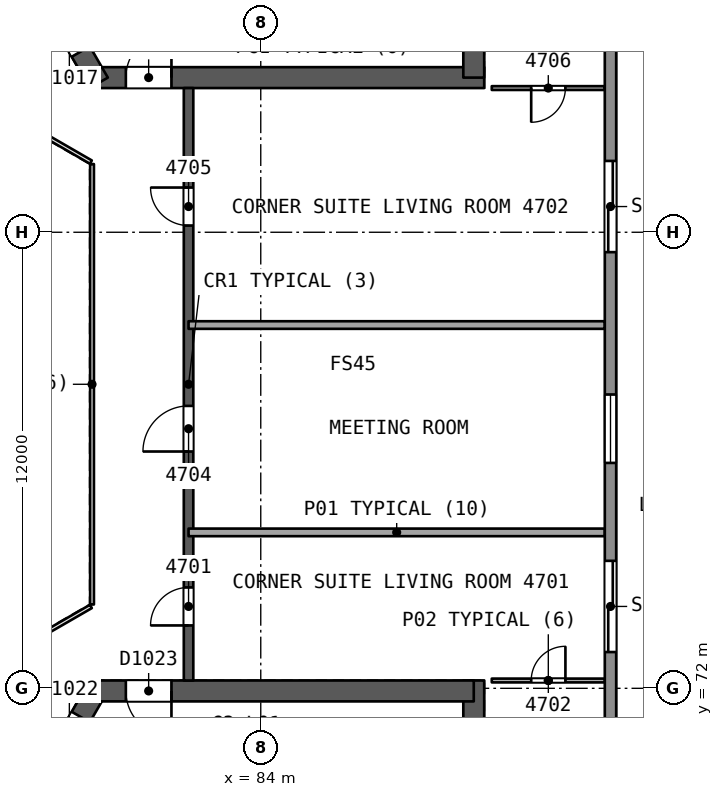
"""IFC4 building model, lengths in metres.
Left out: names, types, materials, properties, quantities, classifications, styles, units other than length and angle.
Written with IfcOpenShell. Run it as: python <this file> out.ifc"""

import sys

from ifc_helpers import new_model, si_unit, direction, frame, frame_2d, origin, place, context, subcontext, project, spatial, rectangle, extrude, element, fill, save


model = new_model("IFC4")
c1 = context("Model", 3, precision=1e-05, world=origin(), true_north=direction((0.0, 1.0)))
c2 = subcontext(c1, "Body", "Model", "MODEL_VIEW")
j1 = project(units=[si_unit("LENGTHUNIT", "METRE"), si_unit("PLANEANGLEUNIT", "RADIAN")], contexts=[c1])
p1 = place(None, origin())
s1 = spatial("IfcSite", under=j1, at=p1, CompositionType="ELEMENT")
p2 = place(p1, origin())
s2 = spatial("IfcBuilding", under=s1, at=p2, CompositionType="ELEMENT")
p3 = place(p2, frame((0.0, 0.0, 193.3)))
s3 = spatial("IfcBuildingStorey", under=s2, at=p3, CompositionType="ELEMENT", Elevation=193.3)
p4 = place(p3, frame((79.659, 88.069, 0.0), z_axis=(0.0, 0.0, 1.0), x_axis=(1.0, 0.0, 0.0)))
e1 = element("IfcWall", 1, at=p4, inside=s3, PredefinedType="SHEAR", context=c2, shape_type="SweptSolid", body=[
    extrude(rectangle(XDim=10.221, YDim=0.55, at=frame_2d((5.111, 0.0))), origin(), (0.0, 0.0, 1.0), 3.7),
])
p5 = place(p4, frame((0.791, 0.0, 0.0)))
e2 = element("IfcOpeningElement", 2, at=p5, cuts=e1, PredefinedType="OPENING", context=c2, shape_type="SweptSolid", body=[
    extrude(rectangle(XDim=1.2, YDim=2.1, at=frame_2d((0.6, 1.05))), frame((0.0, 0.286, 0.0), z_axis=(0.0, -1.0, 0.0), x_axis=(1.0, 0.0, 0.0)), (0.0, 0.0, 1.0), 0.571),
])
p6 = place(p3, frame((89.605, 88.069, 0.0), z_axis=(0.0, 0.0, 1.0), x_axis=(0.0, 1.0, 0.0)))
e3 = element("IfcWall", 3, at=p6, inside=s3, PredefinedType="SHEAR", context=c2, shape_type="SweptSolid", body=[
    extrude(rectangle(XDim=14.058, YDim=0.55, at=frame_2d((7.029, 0.0))), origin(), (0.0, 0.0, 1.0), 3.7),
])
p7 = place(p3, frame((74.686, 96.683, 0.0), z_axis=(0.0, 0.0, 1.0), x_axis=(0.499997818338, -0.866026663364, 0.0)))
e4 = element("IfcWall", 4, at=p7, inside=s3, PredefinedType="SHEAR", context=c2, shape_type="SweptSolid", body=[
    extrude(rectangle(XDim=10.105, YDim=0.55, at=frame_2d((5.052, 0.0))), origin(), (0.0, 0.0, 1.0), 3.7),
])
p8 = place(p7, frame((7.955, 0.0, 0.0)))
e5 = element("IfcOpeningElement", 5, at=p8, cuts=e4, PredefinedType="OPENING", context=c2, shape_type="SweptSolid", body=[
    extrude(rectangle(XDim=1.2, YDim=2.1, at=frame_2d((0.6, 1.05))), frame((0.0, 0.286, 0.0), z_axis=(0.0, -1.0, 0.0), x_axis=(1.0, 0.0, 0.0)), (0.0, 0.0, 1.0), 0.571),
])
p9 = place(p3, frame((79.659, 71.931, 0.0), z_axis=(0.0, 0.0, 1.0), x_axis=(-0.500000202252, -0.866025287014, 0.0)))
e6 = element("IfcWall", 6, at=p9, inside=s3, PredefinedType="SHEAR", context=c2, shape_type="SweptSolid", body=[
    extrude(rectangle(XDim=10.221, YDim=0.55, at=frame_2d((5.111, 0.0))), origin(), (0.0, 0.0, 1.0), 3.7),
])
p10 = place(p9, frame((0.791, 0.0, 0.0)))
e7 = element("IfcOpeningElement", 7, at=p10, cuts=e6, PredefinedType="OPENING", context=c2, shape_type="SweptSolid", body=[
    extrude(rectangle(XDim=1.2, YDim=2.1, at=frame_2d((0.6, 1.05))), frame((0.0, 0.286, 0.0), z_axis=(0.0, -1.0, 0.0), x_axis=(1.0, 0.0, 0.0)), (0.0, 0.0, 1.0), 0.571),
])
p11 = place(p3, frame((89.605, 58.031, 0.0), z_axis=(0.0, 0.0, 1.0), x_axis=(0.0, 1.0, 0.0)))
e8 = element("IfcWall", 8, at=p11, inside=s3, PredefinedType="SHEAR", context=c2, shape_type="SweptSolid", body=[
    extrude(rectangle(XDim=14.175, YDim=0.55, at=frame_2d((7.087, 0.0))), origin(), (0.0, 0.0, 1.0), 3.7),
])
p12 = place(p3, frame((89.605, 71.931, 0.0), z_axis=(0.0, 0.0, 1.0), x_axis=(-1.0, 0.0, 0.0)))
e9 = element("IfcWall", 9, at=p12, inside=s3, PredefinedType="SHEAR", context=c2, shape_type="SweptSolid", body=[
    extrude(rectangle(XDim=10.105, YDim=0.55, at=frame_2d((5.052, 0.0))), origin(), (0.0, 0.0, 1.0), 3.7),
])
p13 = place(p12, frame((7.955, 0.0, 0.0)))
e10 = element("IfcOpeningElement", 10, at=p13, cuts=e9, PredefinedType="OPENING", context=c2, shape_type="SweptSolid", body=[
    extrude(rectangle(XDim=1.2, YDim=2.1, at=frame_2d((0.6, 1.05))), frame((0.0, 0.286, 0.0), z_axis=(0.0, -1.0, 0.0), x_axis=(1.0, 0.0, 0.0)), (0.0, 0.0, 1.0), 0.571),
])
p14 = place(p3, frame((82.1, 72.206, 0.0), z_axis=(0.0, 0.0, 1.0), x_axis=(0.0, 1.0, 0.0)))
e11 = element("IfcWall", 11, at=p14, inside=s3, PredefinedType="SHEAR", context=c2, shape_type="SweptSolid", body=[
    extrude(rectangle(XDim=15.588, YDim=0.25, at=frame_2d((7.794, 0.0))), origin(), (0.0, 0.0, 1.0), 3.3),
])
p15 = place(p14, frame((1.448, 0.0, 0.0)))
e12 = element("IfcOpeningElement", 12, at=p15, cuts=e11, PredefinedType="OPENING", context=c2, shape_type="SweptSolid", body=[
    extrude(rectangle(XDim=1.0, YDim=2.1, at=frame_2d((0.5, 1.05))), frame((0.0, 0.135, 0.0), z_axis=(0.0, -1.0, 0.0), x_axis=(1.0, 0.0, 0.0)), (0.0, 0.0, 1.0), 0.271),
])
p16 = place(p14, frame((6.025, 0.0, 0.0)))
e13 = element("IfcOpeningElement", 13, at=p16, cuts=e11, PredefinedType="OPENING", context=c2, shape_type="SweptSolid", body=[
    extrude(rectangle(XDim=1.2, YDim=2.4, at=frame_2d((0.6, 1.2))), frame((0.0, 0.135, 0.0), z_axis=(0.0, -1.0, 0.0), x_axis=(1.0, 0.0, 0.0)), (0.0, 0.0, 1.0), 0.271),
])
p17 = place(p14, frame((11.971, 0.0, 0.0)))
e14 = element("IfcOpeningElement", 14, at=p17, cuts=e11, PredefinedType="OPENING", context=c2, shape_type="SweptSolid", body=[
    extrude(rectangle(XDim=1.0, YDim=2.1, at=frame_2d((0.5, 1.05))), frame((0.0, 0.135, 0.0), z_axis=(0.0, -1.0, 0.0), x_axis=(1.0, 0.0, 0.0)), (0.0, 0.0, 1.0), 0.271),
])
p18 = place(p3, frame((90.079, 72.206, 0.0), z_axis=(0.0, 0.0, 1.0), x_axis=(1.0, 0.0, 0.0)))
e15 = element("IfcWall", 15, at=p18, inside=s3, PredefinedType="PARTITIONING", context=c2, shape_type="SweptSolid", body=[
    extrude(rectangle(XDim=2.975, YDim=0.1, at=frame_2d((1.488, 0.0))), origin(), (0.0, 0.0, 1.0), 3.3),
])
p19 = place(p18, frame((1.038, 0.0, 0.0)))
e16 = element("IfcOpeningElement", 16, at=p19, cuts=e15, PredefinedType="OPENING", context=c2, shape_type="SweptSolid", body=[
    extrude(rectangle(XDim=0.9, YDim=2.1, at=frame_2d((0.45, 1.05))), frame((0.0, 0.061, 0.0), z_axis=(0.0, -1.0, 0.0), x_axis=(1.0, 0.0, 0.0)), (0.0, 0.0, 1.0), 0.121),
])
for number, where, z_axis, x_axis in (
    (17, (93.054, 76.103, 0.0), (0.0, 0.0, 1.0), (-1.0, 0.0, 0.0)),
    (18, (93.054, 81.559, 0.0), (0.0, 0.0, 1.0), (-1.0, 0.0, 0.0)),
):
    element("IfcWall", number, at=place(p3, frame(where, z_axis=z_axis, x_axis=x_axis)), inside=s3, PredefinedType="PARTITIONING", context=c2, shape_type="SweptSolid", body=[
        extrude(rectangle(XDim=10.954, YDim=0.2, at=frame_2d((5.477, 0.0))), origin(), (0.0, 0.0, 1.0), 3.3),
    ])
p20 = place(p3, frame((93.054, 87.794, 0.0), z_axis=(0.0, 0.0, 1.0), x_axis=(-1.0, 0.0, 0.0)))
e19 = element("IfcWall", 19, at=p20, inside=s3, PredefinedType="PARTITIONING", context=c2, shape_type="SweptSolid", body=[
    extrude(rectangle(XDim=2.975, YDim=0.1, at=frame_2d((1.488, 0.0))), origin(), (0.0, 0.0, 1.0), 3.3),
])
p21 = place(p20, frame((1.038, 0.0, 0.0)))
e20 = element("IfcOpeningElement", 20, at=p21, cuts=e19, PredefinedType="OPENING", context=c2, shape_type="SweptSolid", body=[
    extrude(rectangle(XDim=0.9, YDim=2.1, at=frame_2d((0.45, 1.05))), frame((0.0, 0.061, 0.0), z_axis=(0.0, -1.0, 0.0), x_axis=(1.0, 0.0, 0.0)), (0.0, 0.0, 1.0), 0.121),
])
p22 = place(p3, frame((93.203, 106.173, 0.0), z_axis=(0.0, 0.0, 1.0), x_axis=(0.0, -1.0, 0.0)))
e21 = element("IfcWall", 21, at=p22, inside=s3, PredefinedType="SOLIDWALL", context=c2, shape_type="SweptSolid", body=[
    extrude(rectangle(XDim=52.347, YDim=0.3, at=frame_2d((26.173, 0.0))), origin(), (0.0, 0.0, 1.0), 3.3),
])
p23 = place(p22, frame((30.819, 0.0, 0.0)))
e22 = element("IfcOpeningElement", 22, at=p23, cuts=e21, PredefinedType="OPENING", context=c2, shape_type="SweptSolid", body=[
    extrude(rectangle(XDim=2.4, YDim=2.4, at=frame_2d((1.2, 1.2))), frame((0.0, 0.161, 0.0), z_axis=(0.0, -1.0, 0.0), x_axis=(1.0, 0.0, 0.0)), (0.0, 0.0, 1.0), 0.321),
])
p24 = place(p22, frame((40.7, 0.0, 0.0)))
e23 = element("IfcOpeningElement", 23, at=p24, cuts=e21, PredefinedType="OPENING", context=c2, shape_type="SweptSolid", body=[
    extrude(rectangle(XDim=2.4, YDim=2.4, at=frame_2d((1.2, 1.2))), frame((0.0, 0.161, 0.0), z_axis=(0.0, -1.0, 0.0), x_axis=(1.0, 0.0, 0.0)), (0.0, 0.0, 1.0), 0.321),
])
p25 = place(p22, frame((20.297, 0.0, 0.0)))
e24 = element("IfcOpeningElement", 24, at=p25, cuts=e21, PredefinedType="OPENING", context=c2, shape_type="SweptSolid", body=[
    extrude(rectangle(XDim=2.4, YDim=2.4, at=frame_2d((1.2, 1.2))), frame((0.0, 0.161, 0.0), z_axis=(0.0, -1.0, 0.0), x_axis=(1.0, 0.0, 0.0)), (0.0, 0.0, 1.0), 0.321),
])
p26 = place(p22, frame((9.27, 0.0, 0.0)))
e25 = element("IfcOpeningElement", 25, at=p26, cuts=e21, PredefinedType="OPENING", context=c2, shape_type="SweptSolid", body=[
    extrude(rectangle(XDim=2.4, YDim=2.4, at=frame_2d((1.2, 1.2))), frame((0.0, 0.161, 0.0), z_axis=(0.0, -1.0, 0.0), x_axis=(1.0, 0.0, 0.0)), (0.0, 0.0, 1.0), 0.321),
])
p27 = place(p22, frame((26.442, 0.0, 0.9)))
e26 = element("IfcOpeningElement", 26, at=p27, cuts=e21, PredefinedType="OPENING", context=c2, shape_type="SweptSolid", body=[
    extrude(rectangle(XDim=1.8, YDim=1.5, at=frame_2d((0.9, 0.75))), frame((0.0, 0.161, 0.0), z_axis=(0.0, -1.0, 0.0), x_axis=(1.0, 0.0, 0.0)), (0.0, 0.0, 1.0), 0.321),
])
p28 = place(p3, frame((43.232, 82.678, 0.0), z_axis=(0.0, 0.0, 1.0), x_axis=(0.866025125259, 0.500000482419, 0.0)))
e27 = element("IfcWall", 27, at=p28, inside=s3, PredefinedType="SOLIDWALL", context=c2, shape_type="SweptSolid", body=[
    extrude(rectangle(XDim=52.347, YDim=0.3, at=frame_2d((26.173, 0.0))), origin(), (0.0, 0.0, 1.0), 3.3),
])
p29 = place(p28, frame((31.209, 0.0, 0.0)))
e28 = element("IfcOpeningElement", 28, at=p29, cuts=e27, PredefinedType="OPENING", context=c2, shape_type="SweptSolid", body=[
    extrude(rectangle(XDim=2.4, YDim=2.4, at=frame_2d((1.2, 1.2))), frame((0.0, 0.161, 0.0), z_axis=(0.0, -1.0, 0.0), x_axis=(1.0, 0.0, 0.0)), (0.0, 0.0, 1.0), 0.321),
])
p30 = place(p28, frame((40.7, 0.0, 0.0)))
e29 = element("IfcOpeningElement", 29, at=p30, cuts=e27, PredefinedType="OPENING", context=c2, shape_type="SweptSolid", body=[
    extrude(rectangle(XDim=2.4, YDim=2.4, at=frame_2d((1.2, 1.2))), frame((0.0, 0.161, 0.0), z_axis=(0.0, -1.0, 0.0), x_axis=(1.0, 0.0, 0.0)), (0.0, 0.0, 1.0), 0.321),
])
p31 = place(p28, frame((19.517, 0.0, 0.0)))
e30 = element("IfcOpeningElement", 30, at=p31, cuts=e27, PredefinedType="OPENING", context=c2, shape_type="SweptSolid", body=[
    extrude(rectangle(XDim=2.4, YDim=2.4, at=frame_2d((1.2, 1.2))), frame((0.0, 0.161, 0.0), z_axis=(0.0, -1.0, 0.0), x_axis=(1.0, 0.0, 0.0)), (0.0, 0.0, 1.0), 0.321),
])
p32 = place(p28, frame((9.27, 0.0, 0.0)))
e31 = element("IfcOpeningElement", 31, at=p32, cuts=e27, PredefinedType="OPENING", context=c2, shape_type="SweptSolid", body=[
    extrude(rectangle(XDim=2.4, YDim=2.4, at=frame_2d((1.2, 1.2))), frame((0.0, 0.161, 0.0), z_axis=(0.0, -1.0, 0.0), x_axis=(1.0, 0.0, 0.0)), (0.0, 0.0, 1.0), 0.321),
])
p33 = place(p28, frame((28.001, 0.0, 0.9)))
e32 = element("IfcOpeningElement", 32, at=p33, cuts=e27, PredefinedType="OPENING", context=c2, shape_type="SweptSolid", body=[
    extrude(rectangle(XDim=1.8, YDim=1.5, at=frame_2d((0.9, 0.75))), frame((0.0, 0.161, 0.0), z_axis=(0.0, -1.0, 0.0), x_axis=(1.0, 0.0, 0.0)), (0.0, 0.0, 1.0), 0.321),
])
p34 = place(p28, frame((24.104, 0.0, 0.9)))
e33 = element("IfcOpeningElement", 33, at=p34, cuts=e27, PredefinedType="OPENING", context=c2, shape_type="SweptSolid", body=[
    extrude(rectangle(XDim=1.8, YDim=1.5, at=frame_2d((0.9, 0.75))), frame((0.0, 0.161, 0.0), z_axis=(0.0, -1.0, 0.0), x_axis=(1.0, 0.0, 0.0)), (0.0, 0.0, 1.0), 0.321),
])
p35 = place(p3, frame((88.565, 51.149, 0.0), z_axis=(0.0, 0.0, 1.0), x_axis=(-0.866025125259, 0.500000482419, 0.0)))
e34 = element("IfcWall", 34, at=p35, inside=s3, PredefinedType="SOLIDWALL", context=c2, shape_type="SweptSolid", body=[
    extrude(rectangle(XDim=52.347, YDim=0.3, at=frame_2d((26.173, 0.0))), origin(), (0.0, 0.0, 1.0), 3.3),
])
p36 = place(p35, frame((29.26, 0.0, 0.0)))
e35 = element("IfcOpeningElement", 35, at=p36, cuts=e34, PredefinedType="OPENING", context=c2, shape_type="SweptSolid", body=[
    extrude(rectangle(XDim=2.4, YDim=2.4, at=frame_2d((1.2, 1.2))), frame((0.0, 0.161, 0.0), z_axis=(0.0, -1.0, 0.0), x_axis=(1.0, 0.0, 0.0)), (0.0, 0.0, 1.0), 0.321),
])
p37 = place(p35, frame((40.7, 0.0, 0.0)))
e36 = element("IfcOpeningElement", 36, at=p37, cuts=e34, PredefinedType="OPENING", context=c2, shape_type="SweptSolid", body=[
    extrude(rectangle(XDim=2.4, YDim=2.4, at=frame_2d((1.2, 1.2))), frame((0.0, 0.161, 0.0), z_axis=(0.0, -1.0, 0.0), x_axis=(1.0, 0.0, 0.0)), (0.0, 0.0, 1.0), 0.321),
])
p38 = place(p35, frame((19.517, 0.0, 0.0)))
e37 = element("IfcOpeningElement", 37, at=p38, cuts=e34, PredefinedType="OPENING", context=c2, shape_type="SweptSolid", body=[
    extrude(rectangle(XDim=2.4, YDim=2.4, at=frame_2d((1.2, 1.2))), frame((0.0, 0.161, 0.0), z_axis=(0.0, -1.0, 0.0), x_axis=(1.0, 0.0, 0.0)), (0.0, 0.0, 1.0), 0.321),
])
p39 = place(p35, frame((9.27, 0.0, 0.0)))
e38 = element("IfcOpeningElement", 38, at=p39, cuts=e34, PredefinedType="OPENING", context=c2, shape_type="SweptSolid", body=[
    extrude(rectangle(XDim=2.4, YDim=2.4, at=frame_2d((1.2, 1.2))), frame((0.0, 0.161, 0.0), z_axis=(0.0, -1.0, 0.0), x_axis=(1.0, 0.0, 0.0)), (0.0, 0.0, 1.0), 0.321),
])
p40 = place(p35, frame((24.104, 0.0, 0.9)))
e39 = element("IfcOpeningElement", 39, at=p40, cuts=e34, PredefinedType="OPENING", context=c2, shape_type="SweptSolid", body=[
    extrude(rectangle(XDim=1.8, YDim=1.5, at=frame_2d((0.9, 0.75))), frame((0.0, 0.161, 0.0), z_axis=(0.0, -1.0, 0.0), x_axis=(1.0, 0.0, 0.0)), (0.0, 0.0, 1.0), 0.321),
])
p41 = place(p3, frame((79.56, 74.206, 0.0), z_axis=(0.0, 0.0, 1.0), x_axis=(0.0, 1.0, 0.0)))
e40 = element("IfcWall", 40, at=p41, inside=s3, PredefinedType="PARTITIONING", context=c2, shape_type="SweptSolid", body=[
    extrude(rectangle(XDim=11.588, YDim=0.1, at=frame_2d((5.794, 0.0))), origin(), (0.0, 0.0, 1.0), 3.3),
])
for number, where, z_axis, x_axis in (
    (41, (79.53, 85.846, 0.0), (0.0, 0.0, 1.0), (-0.866, 0.5, 0.0)),
    (42, (77.798, 73.154, 0.0), (0.0, 0.0, 1.0), (0.866, 0.5, 0.0)),
):
    element("IfcWall", number, at=place(p3, frame(where, z_axis=z_axis, x_axis=x_axis)), inside=s3, PredefinedType="PARTITIONING", context=c2, shape_type="SweptSolid", body=[
        extrude(rectangle(XDim=2.0, YDim=0.1, at=frame_2d((1.0, 0.0))), origin(), (0.0, 0.0, 1.0), 3.3),
    ])
p42 = place(p15, origin())
e43 = element("IfcDoor", 43, at=p42, inside=s3, OperationType="SINGLE_SWING_LEFT", PredefinedType="NOTDEFINED", context=c2, shape_type="SweptSolid", body=[
    extrude(rectangle(XDim=1.0, YDim=2.1, at=frame_2d((0.5, 1.05))), frame((0.0, 0.025, 0.0), z_axis=(0.0, -1.0, 0.0), x_axis=(1.0, 0.0, 0.0)), (0.0, 0.0, 1.0), 0.05),
])
fill(e12, e43)
p43 = place(p19, origin())
e44 = element("IfcDoor", 44, at=p43, inside=s3, OperationType="SINGLE_SWING_RIGHT", PredefinedType="NOTDEFINED", context=c2, shape_type="SweptSolid", body=[
    extrude(rectangle(XDim=0.9, YDim=2.1, at=frame_2d((0.45, 1.05))), frame((0.0, 0.025, 0.0), z_axis=(0.0, -1.0, 0.0), x_axis=(1.0, 0.0, 0.0)), (0.0, 0.0, 1.0), 0.05),
])
fill(e16, e44)
p44 = place(p16, origin())
e45 = element("IfcDoor", 45, at=p44, inside=s3, OperationType="SINGLE_SWING_LEFT", PredefinedType="NOTDEFINED", context=c2, shape_type="SweptSolid", body=[
    extrude(rectangle(XDim=1.2, YDim=2.4, at=frame_2d((0.6, 1.2))), frame((0.0, 0.025, 0.0), z_axis=(0.0, -1.0, 0.0), x_axis=(1.0, 0.0, 0.0)), (0.0, 0.0, 1.0), 0.05),
])
fill(e13, e45)
p45 = place(p17, origin())
e46 = element("IfcDoor", 46, at=p45, inside=s3, OperationType="SINGLE_SWING_RIGHT", PredefinedType="NOTDEFINED", context=c2, shape_type="SweptSolid", body=[
    extrude(rectangle(XDim=1.0, YDim=2.1, at=frame_2d((0.5, 1.05))), frame((0.0, 0.025, 0.0), z_axis=(0.0, -1.0, 0.0), x_axis=(1.0, 0.0, 0.0)), (0.0, 0.0, 1.0), 0.05),
])
fill(e14, e46)
p46 = place(p21, origin())
e47 = element("IfcDoor", 47, at=p46, inside=s3, OperationType="SINGLE_SWING_RIGHT", PredefinedType="NOTDEFINED", context=c2, shape_type="SweptSolid", body=[
    extrude(rectangle(XDim=0.9, YDim=2.1, at=frame_2d((0.45, 1.05))), frame((0.0, 0.025, 0.0), z_axis=(0.0, -1.0, 0.0), x_axis=(1.0, 0.0, 0.0)), (0.0, 0.0, 1.0), 0.05),
])
fill(e20, e47)
p47 = place(p23, origin())
e48 = element("IfcDoor", 48, at=p47, inside=s3, OperationType="SLIDING_TO_LEFT", PredefinedType="NOTDEFINED", context=c2, shape_type="SweptSolid", body=[
    extrude(rectangle(XDim=2.4, YDim=2.4, at=frame_2d((1.2, 1.2))), frame((0.0, 0.025, 0.0), z_axis=(0.0, -1.0, 0.0), x_axis=(1.0, 0.0, 0.0)), (0.0, 0.0, 1.0), 0.05),
])
fill(e22, e48)
p48 = place(p25, origin())
e49 = element("IfcDoor", 49, at=p48, inside=s3, OperationType="SLIDING_TO_LEFT", PredefinedType="NOTDEFINED", context=c2, shape_type="SweptSolid", body=[
    extrude(rectangle(XDim=2.4, YDim=2.4, at=frame_2d((1.2, 1.2))), frame((0.0, 0.025, 0.0), z_axis=(0.0, -1.0, 0.0), x_axis=(1.0, 0.0, 0.0)), (0.0, 0.0, 1.0), 0.05),
])
fill(e24, e49)
p49 = place(p27, origin())
e50 = element("IfcWindow", 50, at=p49, inside=s3, PartitioningType="SINGLE_PANEL", PredefinedType="WINDOW", context=c2, shape_type="SweptSolid", body=[
    extrude(rectangle(XDim=1.8, YDim=1.5, at=frame_2d((0.9, 0.75))), frame((0.0, 0.03, 0.0), z_axis=(0.0, -1.0, 0.0), x_axis=(1.0, 0.0, 0.0)), (0.0, 0.0, 1.0), 0.06),
])
fill(e26, e50)
p50 = place(p5, origin())
e51 = element("IfcDoor", 51, at=p50, inside=s3, OperationType="SINGLE_SWING_RIGHT", PredefinedType="NOTDEFINED", context=c2, shape_type="SweptSolid", body=[
    extrude(rectangle(XDim=1.2, YDim=2.1, at=frame_2d((0.6, 1.05))), frame((0.0, 0.025, 0.0), z_axis=(0.0, -1.0, 0.0), x_axis=(1.0, 0.0, 0.0)), (0.0, 0.0, 1.0), 0.05),
])
fill(e2, e51)
p51 = place(p8, origin())
e52 = element("IfcDoor", 52, at=p51, inside=s3, OperationType="SINGLE_SWING_LEFT", PredefinedType="NOTDEFINED", context=c2, shape_type="SweptSolid", body=[
    extrude(rectangle(XDim=1.2, YDim=2.1, at=frame_2d((0.6, 1.05))), frame((0.0, 0.025, 0.0), z_axis=(0.0, -1.0, 0.0), x_axis=(1.0, 0.0, 0.0)), (0.0, 0.0, 1.0), 0.05),
])
fill(e5, e52)
p52 = place(p10, origin())
e53 = element("IfcDoor", 53, at=p52, inside=s3, OperationType="SINGLE_SWING_RIGHT", PredefinedType="NOTDEFINED", context=c2, shape_type="SweptSolid", body=[
    extrude(rectangle(XDim=1.2, YDim=2.1, at=frame_2d((0.6, 1.05))), frame((0.0, 0.025, 0.0), z_axis=(0.0, -1.0, 0.0), x_axis=(1.0, 0.0, 0.0)), (0.0, 0.0, 1.0), 0.05),
])
fill(e7, e53)
p53 = place(p13, origin())
e54 = element("IfcDoor", 54, at=p53, inside=s3, OperationType="SINGLE_SWING_LEFT", PredefinedType="NOTDEFINED", context=c2, shape_type="SweptSolid", body=[
    extrude(rectangle(XDim=1.2, YDim=2.1, at=frame_2d((0.6, 1.05))), frame((0.0, 0.025, 0.0), z_axis=(0.0, -1.0, 0.0), x_axis=(1.0, 0.0, 0.0)), (0.0, 0.0, 1.0), 0.05),
])
fill(e10, e54)
save(model, sys.argv[1])
